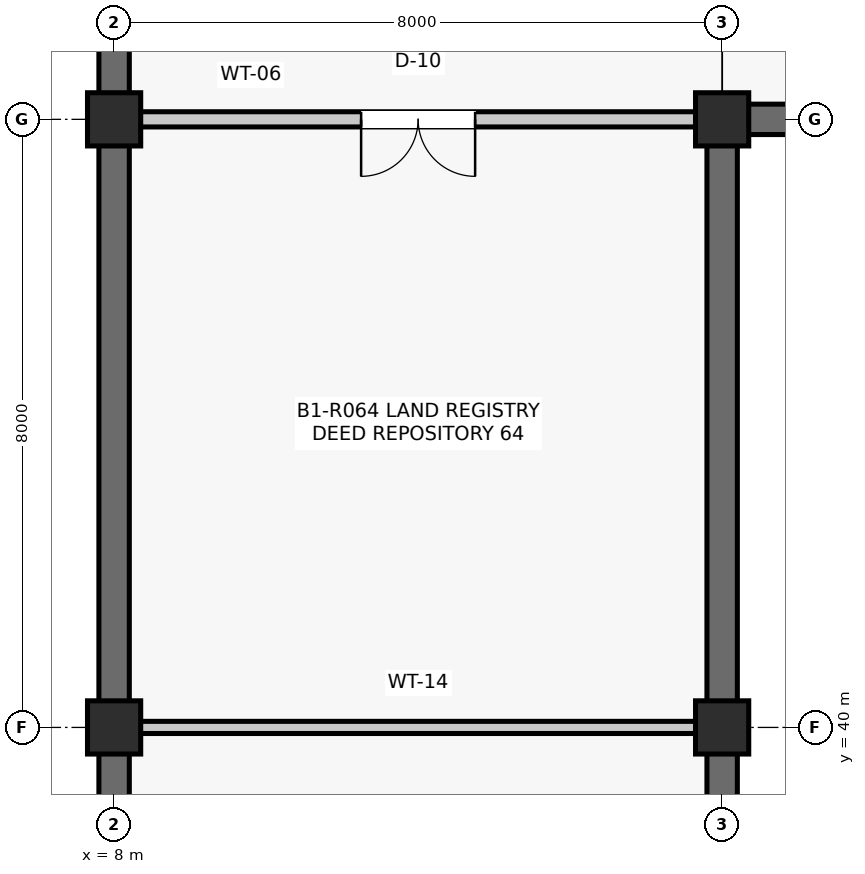
"""IFC4 building model, lengths in metres.
Left out: names, types, materials, properties, quantities, classifications, styles, units other than length and angle.
Written with IfcOpenShell. Run it as: python <this file> out.ifc"""

import sys

from ifc_helpers import new_model, si_unit, direction, frame, frame_2d, origin, origin_2d, place, context, subcontext, project, spatial, rectangle, extrude, element, fill, save


model = new_model("IFC4")
c1 = context("Model", 3, precision=1e-05, world=origin(), true_north=direction((0.0, 1.0)))
c2 = subcontext(c1, "Body", "Model", "MODEL_VIEW")
j1 = project(units=[si_unit("LENGTHUNIT", "METRE"), si_unit("PLANEANGLEUNIT", "RADIAN")], contexts=[c1])
p1 = place(None, origin())
s1 = spatial("IfcSite", under=j1, at=p1, CompositionType="ELEMENT")
p2 = place(p1, origin())
s2 = spatial("IfcBuilding", under=s1, at=p2, CompositionType="ELEMENT")
p3 = place(p2, frame((0.0, 0.0, -4.29)))
s3 = spatial("IfcBuildingStorey", under=s2, at=p3, CompositionType="ELEMENT", Elevation=-4.29)
for number, where, z_axis, x_axis in (
    (1, (8.0, 40.0, 0.0), (0.0, 0.0, 1.0), (1.0, 0.0, 0.0)),
    (2, (8.0, 48.0, 0.0), (0.0, 0.0, 1.0), (1.0, 0.0, 0.0)),
    (3, (16.0, 40.0, 0.0), (0.0, 0.0, 1.0), (1.0, 0.0, 0.0)),
    (4, (16.0, 48.0, 0.0), (0.0, 0.0, 1.0), (1.0, 0.0, 0.0)),
):
    element("IfcColumn", number, at=place(p3, frame(where, z_axis=z_axis, x_axis=x_axis)), inside=s3, PredefinedType="COLUMN", context=c2, shape_type="SweptSolid", body=[
        extrude(rectangle(XDim=0.7, YDim=0.7, at=origin_2d()), origin(), (0.0, 0.0, 1.0), 4.29),
    ])
p4 = place(p3, frame((8.0, 32.335, 0.0), z_axis=(0.0, 0.0, 1.0), x_axis=(0.0, 1.0, 0.0)))
e5 = element("IfcWall", 5, at=p4, inside=s3, PredefinedType="SHEAR", context=c2, shape_type="SweptSolid", body=[
    extrude(rectangle(XDim=7.33, YDim=0.4, at=frame_2d((3.665, 0.0))), origin(), (0.0, 0.0, 1.0), 3.409),
])
for number, where, z_axis, x_axis in (
    (6, (16.0, 32.335, 0.0), (0.0, 0.0, 1.0), (0.0, 1.0, 0.0)),
    (7, (8.0, 40.335, 0.0), (0.0, 0.0, 1.0), (0.0, 1.0, 0.0)),
):
    element("IfcWall", number, at=place(p3, frame(where, z_axis=z_axis, x_axis=x_axis)), inside=s3, PredefinedType="SHEAR", context=c2, shape_type="SweptSolid", body=[
        extrude(rectangle(XDim=7.33, YDim=0.4, at=frame_2d((3.665, 0.0))), origin(), (0.0, 0.0, 1.0), 3.401),
    ])
p5 = place(p3, frame((16.0, 40.335, 0.0), z_axis=(0.0, 0.0, 1.0), x_axis=(0.0, 1.0, 0.0)))
e8 = element("IfcWall", 8, at=p5, inside=s3, PredefinedType="SHEAR", context=c2, shape_type="SweptSolid", body=[
    extrude(rectangle(XDim=7.33, YDim=0.4, at=frame_2d((3.665, 0.0))), origin(), (0.0, 0.0, 1.0), 3.604),
])
p6 = place(p3, frame((8.0, 48.335, 0.0), z_axis=(0.0, 0.0, 1.0), x_axis=(0.0, 1.0, 0.0)))
e9 = element("IfcWall", 9, at=p6, inside=s3, PredefinedType="SHEAR", context=c2, shape_type="SweptSolid", body=[
    extrude(rectangle(XDim=7.33, YDim=0.4, at=frame_2d((3.665, 0.0))), origin(), (0.0, 0.0, 1.0), 3.468),
])
p7 = place(p3, frame((16.335, 48.0, 0.0), z_axis=(0.0, 0.0, 1.0), x_axis=(1.0, 0.0, 0.0)))
e10 = element("IfcWall", 10, at=p7, inside=s3, PredefinedType="SHEAR", context=c2, shape_type="SweptSolid", body=[
    extrude(rectangle(XDim=7.33, YDim=0.4, at=frame_2d((3.665, 0.0))), origin(), (0.0, 0.0, 1.0), 3.667),
])
p8 = place(p3, frame((8.34, 40.0, 0.0), z_axis=(0.0, 0.0, 1.0), x_axis=(1.0, 0.0, 0.0)))
e11 = element("IfcWall", 11, at=p8, inside=s3, PredefinedType="PARTITIONING", context=c2, shape_type="SweptSolid", body=[
    extrude(rectangle(XDim=7.32, YDim=0.16, at=frame_2d((3.66, 0.0))), origin(), (0.0, 0.0, 1.0), 3.326),
])
p9 = place(p3, frame((8.34, 48.0, 0.0), z_axis=(0.0, 0.0, 1.0), x_axis=(1.0, 0.0, 0.0)))
e12 = element("IfcWall", 12, at=p9, inside=s3, PredefinedType="PARTITIONING", context=c2, shape_type="SweptSolid", body=[
    extrude(rectangle(XDim=7.32, YDim=0.2, at=frame_2d((3.66, 0.0))), origin(), (0.0, 0.0, 1.0), 3.394),
])
p10 = place(p9, frame((2.91, 0.0, 0.0)))
e13 = element("IfcOpeningElement", 13, at=p10, cuts=e12, PredefinedType="OPENING", context=c2, shape_type="SweptSolid", body=[
    extrude(rectangle(XDim=1.5, YDim=2.25, at=frame_2d((0.75, 1.125))), frame((0.0, 0.11, 0.0), z_axis=(0.0, -1.0, 0.0), x_axis=(1.0, 0.0, 0.0)), (0.0, 0.0, 1.0), 0.22),
])
p11 = place(p10, frame((1.5, 0.0, 0.0), z_axis=(0.0, 0.0, 1.0), x_axis=(-1.0, 0.0, 0.0)))
e14 = element("IfcDoor", 14, at=p11, inside=s3, OperationType="DOUBLE_DOOR_SINGLE_SWING", PredefinedType="DOOR", context=c2, shape_type="SweptSolid", body=[
    extrude(rectangle(XDim=1.5, YDim=2.25, at=frame_2d((0.75, 1.125))), frame((0.0, 0.025, 0.0), z_axis=(0.0, -1.0, 0.0), x_axis=(1.0, 0.0, 0.0)), (0.0, 0.0, 1.0), 0.05),
])
fill(e13, e14)
save(model, sys.argv[1])
